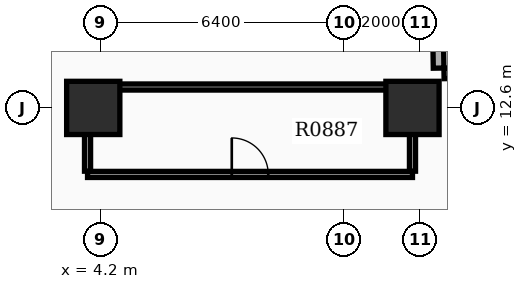
"""IFC4 building model, lengths in metres.
Left out: names, types, materials, properties, quantities, classifications, styles, units other than length and angle.
Written with IfcOpenShell. Run it as: python <this file> out.ifc"""

import sys

from ifc_helpers import new_model, si_unit, direction, frame, frame_2d, origin, origin_2d, place, context, subcontext, project, spatial, rectangle, extrude, element, fill, save


model = new_model("IFC4")
c1 = context("Model", 3, precision=1e-05, world=origin(), true_north=direction((0.0, 1.0)))
c2 = subcontext(c1, "Body", "Model", "MODEL_VIEW")
j1 = project(units=[si_unit("LENGTHUNIT", "METRE"), si_unit("PLANEANGLEUNIT", "RADIAN")], contexts=[c1])
p1 = place(None, origin())
s1 = spatial("IfcSite", under=j1, at=p1, CompositionType="ELEMENT")
p2 = place(p1, origin())
s2 = spatial("IfcBuilding", under=s1, at=p2, CompositionType="ELEMENT")
p3 = place(p2, frame((0.0, 0.0, 60.0)))
s3 = spatial("IfcBuildingStorey", under=s2, at=p3, CompositionType="ELEMENT", Elevation=60.0)
for number, where, z_axis, x_axis in (
    (1, (12.4, 12.6, 0.0), (0.0, 0.0, 1.0), (1.0, 0.0, 0.0)),
    (2, (4.0, 12.6, 0.0), (0.0, 0.0, 1.0), (1.0, 0.0, 0.0)),
):
    element("IfcColumn", number, at=place(p3, frame(where, z_axis=z_axis, x_axis=x_axis)), inside=s3, PredefinedType="COLUMN", context=c2, shape_type="SweptSolid", body=[
        extrude(rectangle(XDim=1.4, YDim=1.4, at=origin_2d()), origin(), (0.0, 0.0, 1.0), 3.9),
    ])
p4 = place(p3, frame((14.449, 13.529, 0.0), z_axis=(0.0, 0.0, 1.0), x_axis=(-0.999878147354, -0.015610587569, 0.0)))
e3 = element("IfcWall", 3, at=p4, inside=s3, PredefinedType="STANDARD", context=c2, shape_type="SweptSolid", body=[
    extrude(rectangle(XDim=1.22, YDim=0.28, at=frame_2d((0.61, 0.0))), origin(), (0.0, 0.0, 1.0), 2.91),
])
p5 = place(p3, frame((13.087, 13.647, 0.0), z_axis=(0.0, 0.0, 1.0), x_axis=(-0.015785793208, 0.999875396603, 0.0)))
e4 = element("IfcWall", 4, at=p5, inside=s3, PredefinedType="STANDARD", context=c2, shape_type="SweptSolid", body=[
    extrude(rectangle(XDim=1.5, YDim=0.28, at=frame_2d((0.75, 0.0))), origin(), (0.0, 0.0, 1.0), 2.91),
])
p6 = place(p3, frame((3.85, 10.85, 0.0), z_axis=(0.0, 0.0, 1.0), x_axis=(1.0, 0.0, 0.0)))
e5 = element("IfcWall", 5, at=p6, inside=s3, PredefinedType="PARTITIONING", context=c2, shape_type="SweptSolid", body=[
    extrude(rectangle(XDim=8.55, YDim=0.16, at=frame_2d((4.275, 0.0))), origin(), (0.0, 0.0, 1.0), 2.9),
])
p7 = place(p6, frame((3.795, 0.0, 0.0)))
e6 = element("IfcOpeningElement", 6, at=p7, cuts=e5, PredefinedType="OPENING", context=c2, shape_type="SweptSolid", body=[
    extrude(rectangle(XDim=0.96, YDim=2.15, at=frame_2d((0.48, 1.075))), frame((0.0, 0.09, 0.0), z_axis=(0.0, -1.0, 0.0), x_axis=(1.0, 0.0, 0.0)), (0.0, 0.0, 1.0), 0.18),
])
p8 = place(p3, frame((3.85, 13.15, 0.0), z_axis=(0.0, 0.0, 1.0), x_axis=(1.0, 0.0, 0.0)))
e7 = element("IfcWall", 7, at=p8, inside=s3, PredefinedType="PARTITIONING", context=c2, shape_type="SweptSolid", body=[
    extrude(rectangle(XDim=8.55, YDim=0.16, at=frame_2d((4.275, 0.0))), origin(), (0.0, 0.0, 1.0), 2.9),
])
for number, where, z_axis, x_axis in (
    (8, (3.85, 10.935, 0.0), (0.0, 0.0, 1.0), (0.0, 1.0, 0.0)),
    (9, (12.4, 10.935, 0.0), (0.0, 0.0, 1.0), (0.0, 1.0, 0.0)),
):
    element("IfcWall", number, at=place(p3, frame(where, z_axis=z_axis, x_axis=x_axis)), inside=s3, PredefinedType="PARTITIONING", context=c2, shape_type="SweptSolid", body=[
        extrude(rectangle(XDim=2.13, YDim=0.16, at=frame_2d((1.065, 0.0))), origin(), (0.0, 0.0, 1.0), 2.9),
    ])
p9 = place(p7, origin())
e10 = element("IfcDoor", 10, at=p9, inside=s3, OperationType="SINGLE_SWING_LEFT", PredefinedType="DOOR", context=c2, shape_type="SweptSolid", body=[
    extrude(rectangle(XDim=0.96, YDim=2.15, at=frame_2d((0.48, 1.075))), frame((0.0, 0.025, 0.0), z_axis=(0.0, -1.0, 0.0), x_axis=(1.0, 0.0, 0.0)), (0.0, 0.0, 1.0), 0.05),
])
fill(e6, e10)
save(model, sys.argv[1])
